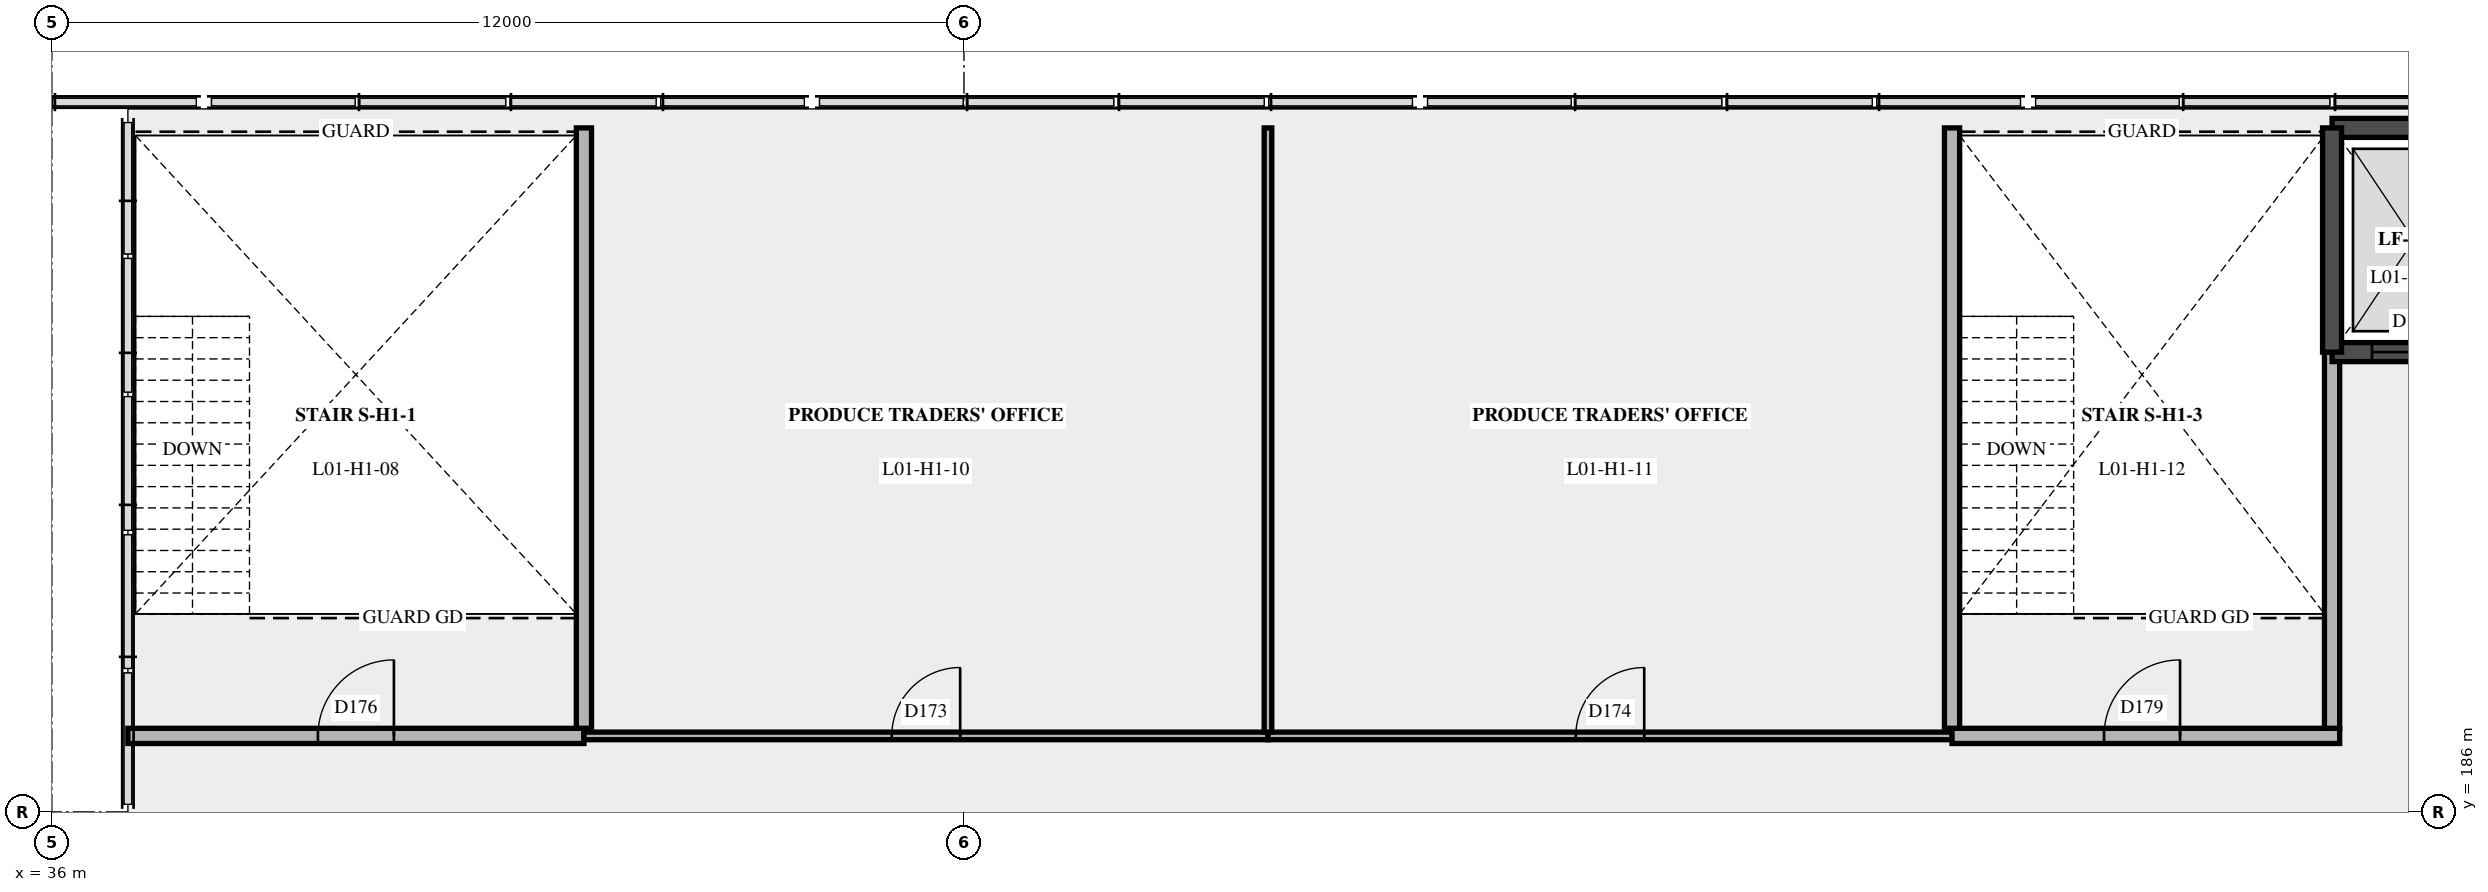
"""IFC4 building model, lengths in metres.
Left out: names, types, materials, properties, quantities, classifications, styles, units other than length and angle.
Written with IfcOpenShell. Run it as: python <this file> out.ifc"""

import sys

from ifc_helpers import new_model, si_unit, direction, frame, frame_2d, origin, place, context, subcontext, project, spatial, rectangle, extrude, element, fill, save


model = new_model("IFC4")
c1 = context("Model", 3, precision=1e-05, world=origin(), true_north=direction((0.0, 1.0)))
c2 = subcontext(c1, "Body", "Model", "MODEL_VIEW")
j1 = project(units=[si_unit("LENGTHUNIT", "METRE"), si_unit("PLANEANGLEUNIT", "RADIAN")], contexts=[c1])
p1 = place(None, origin())
s1 = spatial("IfcSite", under=j1, at=p1, CompositionType="ELEMENT")
p2 = place(p1, origin())
s2 = spatial("IfcBuilding", under=s1, at=p2, CompositionType="ELEMENT")
p3 = place(p2, frame((0.0, 0.0, 5.4)))
s3 = spatial("IfcBuildingStorey", under=s2, at=p3, CompositionType="ELEMENT", Elevation=5.4)
p4 = place(p3, frame((37.0, 187.0, 0.0), z_axis=(0.0, 0.0, 1.0), x_axis=(1.0, 0.0, 0.0)))
e1 = element("IfcWall", 1, at=p4, inside=s3, PredefinedType="PARTITIONING", context=c2, shape_type="SweptSolid", body=[
    extrude(rectangle(XDim=6.0, YDim=0.2, at=frame_2d((3.0, 0.0))), origin(), (0.0, 0.0, 1.0), 3.6),
])
p5 = place(p4, frame((2.5, 0.0, 0.0)))
e2 = element("IfcOpeningElement", 2, at=p5, cuts=e1, PredefinedType="OPENING", context=c2, shape_type="SweptSolid", body=[
    extrude(rectangle(XDim=1.0, YDim=2.1, at=frame_2d((0.5, 1.05))), frame((0.0, 0.11, 0.0), z_axis=(0.0, -1.0, 0.0), x_axis=(1.0, 0.0, 0.0)), (0.0, 0.0, 1.0), 0.22),
])
p6 = place(p3, frame((43.0, 187.0, 0.0), z_axis=(0.0, 0.0, 1.0), x_axis=(1.0, 0.0, 0.0)))
e3 = element("IfcWall", 3, at=p6, inside=s3, PredefinedType="PARTITIONING", context=c2, shape_type="SweptSolid", body=[
    extrude(rectangle(XDim=9.0, YDim=0.1, at=frame_2d((4.5, 0.0))), origin(), (0.0, 0.0, 1.0), 3.6),
])
p7 = place(p6, frame((4.05, 0.0, 0.0)))
e4 = element("IfcOpeningElement", 4, at=p7, cuts=e3, PredefinedType="OPENING", context=c2, shape_type="SweptSolid", body=[
    extrude(rectangle(XDim=0.9, YDim=2.1, at=frame_2d((0.45, 1.05))), frame((0.0, 0.06, 0.0), z_axis=(0.0, -1.0, 0.0), x_axis=(1.0, 0.0, 0.0)), (0.0, 0.0, 1.0), 0.12),
])
p8 = place(p3, frame((52.0, 187.0, 0.0), z_axis=(0.0, 0.0, 1.0), x_axis=(1.0, 0.0, 0.0)))
e5 = element("IfcWall", 5, at=p8, inside=s3, PredefinedType="PARTITIONING", context=c2, shape_type="SweptSolid", body=[
    extrude(rectangle(XDim=9.0, YDim=0.1, at=frame_2d((4.5, 0.0))), origin(), (0.0, 0.0, 1.0), 3.6),
])
p9 = place(p8, frame((4.05, 0.0, 0.0)))
e6 = element("IfcOpeningElement", 6, at=p9, cuts=e5, PredefinedType="OPENING", context=c2, shape_type="SweptSolid", body=[
    extrude(rectangle(XDim=0.9, YDim=2.1, at=frame_2d((0.45, 1.05))), frame((0.0, 0.06, 0.0), z_axis=(0.0, -1.0, 0.0), x_axis=(1.0, 0.0, 0.0)), (0.0, 0.0, 1.0), 0.12),
])
p10 = place(p3, frame((61.0, 187.0, 0.0), z_axis=(0.0, 0.0, 1.0), x_axis=(1.0, 0.0, 0.0)))
e7 = element("IfcWall", 7, at=p10, inside=s3, PredefinedType="PARTITIONING", context=c2, shape_type="SweptSolid", body=[
    extrude(rectangle(XDim=5.1, YDim=0.2, at=frame_2d((2.55, 0.0))), origin(), (0.0, 0.0, 1.0), 3.6),
])
p11 = place(p10, frame((2.0, 0.0, 0.0)))
e8 = element("IfcOpeningElement", 8, at=p11, cuts=e7, PredefinedType="OPENING", context=c2, shape_type="SweptSolid", body=[
    extrude(rectangle(XDim=1.0, YDim=2.1, at=frame_2d((0.5, 1.05))), frame((0.0, 0.11, 0.0), z_axis=(0.0, -1.0, 0.0), x_axis=(1.0, 0.0, 0.0)), (0.0, 0.0, 1.0), 0.22),
])
p12 = place(p3, frame((43.0, 187.1, 0.0), z_axis=(0.0, 0.0, 1.0), x_axis=(0.0, 1.0, 0.0)))
e9 = element("IfcWall", 9, at=p12, inside=s3, PredefinedType="PARTITIONING", context=c2, shape_type="SweptSolid", body=[
    extrude(rectangle(XDim=7.9, YDim=0.2, at=frame_2d((3.95, 0.0))), origin(), (0.0, 0.0, 1.0), 3.6),
])
p13 = place(p3, frame((52.0, 187.05, 0.0), z_axis=(0.0, 0.0, 1.0), x_axis=(0.0, 1.0, 0.0)))
e10 = element("IfcWall", 10, at=p13, inside=s3, PredefinedType="PARTITIONING", context=c2, shape_type="SweptSolid", body=[
    extrude(rectangle(XDim=7.95, YDim=0.1, at=frame_2d((3.975, 0.0))), origin(), (0.0, 0.0, 1.0), 3.6),
])
p14 = place(p3, frame((61.0, 187.1, 0.0), z_axis=(0.0, 0.0, 1.0), x_axis=(0.0, 1.0, 0.0)))
e11 = element("IfcWall", 11, at=p14, inside=s3, PredefinedType="PARTITIONING", context=c2, shape_type="SweptSolid", body=[
    extrude(rectangle(XDim=7.9, YDim=0.2, at=frame_2d((3.95, 0.0))), origin(), (0.0, 0.0, 1.0), 3.6),
])
p15 = place(p3, frame((66.0, 187.1, 0.0), z_axis=(0.0, 0.0, 1.0), x_axis=(0.0, 1.0, 0.0)))
e12 = element("IfcWall", 12, at=p15, inside=s3, PredefinedType="PARTITIONING", context=c2, shape_type="SweptSolid", body=[
    extrude(rectangle(XDim=4.95, YDim=0.2, at=frame_2d((2.475, 0.0))), origin(), (0.0, 0.0, 1.0), 3.6),
])
p16 = place(p3, frame((68.15, 195.0, 0.0), z_axis=(0.0, 0.0, 1.0), x_axis=(-1.0, 0.0, 0.0)))
e13 = element("IfcWall", 13, at=p16, inside=s3, PredefinedType="SHEAR", context=c2, shape_type="SweptSolid", body=[
    extrude(rectangle(XDim=2.15, YDim=0.25, at=frame_2d((1.075, 0.0))), origin(), (0.0, 0.0, 1.0), 4.2),
])
p17 = place(p3, frame((66.0, 192.05, 0.0), z_axis=(0.0, 0.0, 1.0), x_axis=(1.0, 0.0, 0.0)))
e14 = element("IfcWall", 14, at=p17, inside=s3, PredefinedType="SHEAR", context=c2, shape_type="SweptSolid", body=[
    extrude(rectangle(XDim=2.15, YDim=0.25, at=frame_2d((1.075, 0.0))), origin(), (0.0, 0.0, 1.0), 4.2),
])
p18 = place(p17, frame((0.525, 0.0, 0.0)))
e15 = element("IfcOpeningElement", 15, at=p18, cuts=e14, PredefinedType="OPENING", context=c2, shape_type="SweptSolid", body=[
    extrude(rectangle(XDim=1.1, YDim=2.1, at=frame_2d((0.55, 1.05))), frame((0.0, 0.135, 0.0), z_axis=(0.0, -1.0, 0.0), x_axis=(1.0, 0.0, 0.0)), (0.0, 0.0, 1.0), 0.27),
])
p19 = place(p3, frame((66.0, 195.0, 0.0), z_axis=(0.0, 0.0, 1.0), x_axis=(0.0, -1.0, 0.0)))
e16 = element("IfcWall", 16, at=p19, inside=s3, PredefinedType="SHEAR", context=c2, shape_type="SweptSolid", body=[
    extrude(rectangle(XDim=2.95, YDim=0.25, at=frame_2d((1.475, 0.0))), origin(), (0.0, 0.0, 1.0), 4.2),
])
p20 = place(p7, origin())
e17 = element("IfcDoor", 17, at=p20, inside=s3, OperationType="SINGLE_SWING_RIGHT", PredefinedType="DOOR", context=c2, shape_type="SweptSolid", body=[
    extrude(rectangle(XDim=0.9, YDim=2.1, at=frame_2d((0.45, 1.05))), frame((0.0, 0.025, 0.0), z_axis=(0.0, -1.0, 0.0), x_axis=(1.0, 0.0, 0.0)), (0.0, 0.0, 1.0), 0.05),
])
fill(e4, e17)
p21 = place(p9, origin())
e18 = element("IfcDoor", 18, at=p21, inside=s3, OperationType="SINGLE_SWING_RIGHT", PredefinedType="DOOR", context=c2, shape_type="SweptSolid", body=[
    extrude(rectangle(XDim=0.9, YDim=2.1, at=frame_2d((0.45, 1.05))), frame((0.0, 0.025, 0.0), z_axis=(0.0, -1.0, 0.0), x_axis=(1.0, 0.0, 0.0)), (0.0, 0.0, 1.0), 0.05),
])
fill(e6, e18)
p22 = place(p5, origin())
e19 = element("IfcDoor", 19, at=p22, inside=s3, OperationType="SINGLE_SWING_RIGHT", PredefinedType="DOOR", context=c2, shape_type="SweptSolid", body=[
    extrude(rectangle(XDim=1.0, YDim=2.1, at=frame_2d((0.5, 1.05))), frame((0.0, 0.025, 0.0), z_axis=(0.0, -1.0, 0.0), x_axis=(1.0, 0.0, 0.0)), (0.0, 0.0, 1.0), 0.05),
])
fill(e2, e19)
p23 = place(p11, origin())
e20 = element("IfcDoor", 20, at=p23, inside=s3, OperationType="SINGLE_SWING_RIGHT", PredefinedType="DOOR", context=c2, shape_type="SweptSolid", body=[
    extrude(rectangle(XDim=1.0, YDim=2.1, at=frame_2d((0.5, 1.05))), frame((0.0, 0.025, 0.0), z_axis=(0.0, -1.0, 0.0), x_axis=(1.0, 0.0, 0.0)), (0.0, 0.0, 1.0), 0.05),
])
fill(e8, e20)
p24 = place(p18, origin())
e21 = element("IfcDoor", 21, at=p24, inside=s3, OperationType="SLIDING_TO_LEFT", PredefinedType="DOOR", context=c2, shape_type="SweptSolid", body=[
    extrude(rectangle(XDim=1.1, YDim=2.1, at=frame_2d((0.55, 1.05))), frame((0.0, 0.025, 0.0), z_axis=(0.0, -1.0, 0.0), x_axis=(1.0, 0.0, 0.0)), (0.0, 0.0, 1.0), 0.05),
])
fill(e15, e21)
save(model, sys.argv[1])
